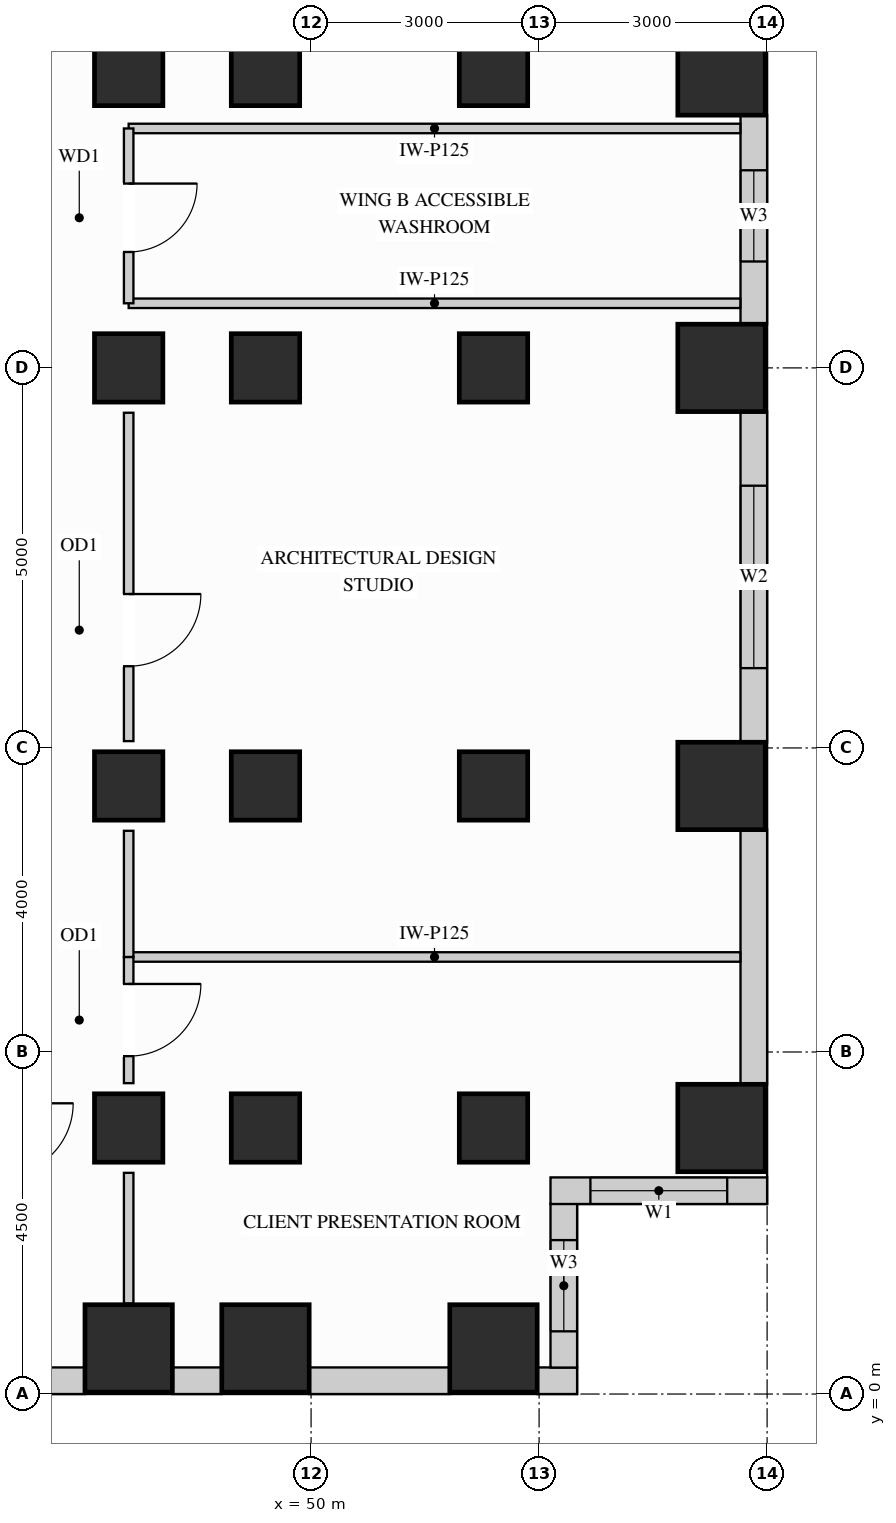
"""IFC4 building model, lengths in metres.
Left out: names, types, materials, properties, quantities, classifications, styles, units other than length and angle.
Written with IfcOpenShell. Run it as: python <this file> out.ifc"""

import sys

from ifc_helpers import new_model, si_unit, direction, frame, frame_2d, origin, origin_2d, place, context, subcontext, project, spatial, rectangle, extrude, source, transform, mapped, element, fill, save


model = new_model("IFC4")
c1 = context("Model", 3, precision=1e-05, world=origin(), true_north=direction((0.0, 1.0)))
c2 = subcontext(c1, "Body", "Model", "MODEL_VIEW")
j1 = project(units=[si_unit("LENGTHUNIT", "METRE"), si_unit("PLANEANGLEUNIT", "RADIAN")], contexts=[c1])
p1 = place(None, origin())
s1 = spatial("IfcSite", under=j1, at=p1, CompositionType="ELEMENT")
p2 = place(p1, origin())
s2 = spatial("IfcBuilding", under=s1, at=p2, CompositionType="ELEMENT")
p3 = place(p2, frame((0.0, 0.0, 135.0)))
s3 = spatial("IfcBuildingStorey", under=s2, at=p3, CompositionType="ELEMENT", Elevation=135.0)
m1 = source(origin(), c2, "Body", "SweptSolid", [
    extrude(rectangle(XDim=0.9, YDim=0.9, at=origin_2d()), origin(), (0.0, 0.0, 1.0), 3.32),
])
for number, where, z_axis, x_axis in (
    (1, (47.6, 13.5, 0.0), (0.0, 0.0, 1.0), (1.0, 0.0, 0.0)),
    (2, (47.6, 3.5, 0.0), (0.0, 0.0, 1.0), (1.0, 0.0, 0.0)),
    (3, (47.6, 8.0, 0.0), (0.0, 0.0, 1.0), (1.0, 0.0, 0.0)),
    (4, (47.6, 17.4, 0.0), (0.0, 0.0, 1.0), (1.0, 0.0, 0.0)),
    (5, (49.4, 13.5, 0.0), (0.0, 0.0, 1.0), (1.0, 0.0, 0.0)),
    (6, (49.4, 17.4, 0.0), (0.0, 0.0, 1.0), (1.0, 0.0, 0.0)),
    (7, (49.4, 3.5, 0.0), (0.0, 0.0, 1.0), (1.0, 0.0, 0.0)),
    (8, (49.4, 8.0, 0.0), (0.0, 0.0, 1.0), (1.0, 0.0, 0.0)),
    (9, (52.4, 13.5, 0.0), (0.0, 0.0, 1.0), (1.0, 0.0, 0.0)),
    (10, (52.4, 17.4, 0.0), (0.0, 0.0, 1.0), (1.0, 0.0, 0.0)),
    (11, (52.4, 3.5, 0.0), (0.0, 0.0, 1.0), (1.0, 0.0, 0.0)),
    (12, (52.4, 8.0, 0.0), (0.0, 0.0, 1.0), (1.0, 0.0, 0.0)),
):
    element("IfcColumn", number, at=place(p3, frame(where, z_axis=z_axis, x_axis=x_axis)), inside=s3, PredefinedType="COLUMN", context=c2, shape_type="MappedRepresentation", body=[
        mapped(m1, transform((0.0, 0.0, 0.0), x_axis=(1.0, 0.0, 0.0), y_axis=(0.0, 1.0, 0.0), z_axis=(0.0, 0.0, 1.0))),
    ])
m2 = source(origin(), c2, "Body", "SweptSolid", [
    extrude(rectangle(XDim=1.15, YDim=1.15, at=origin_2d()), origin(), (0.0, 0.0, 1.0), 3.32),
])
for number, where, z_axis, x_axis in (
    (13, (55.4, 13.5, 0.0), (0.0, 0.0, 1.0), (1.0, 0.0, 0.0)),
    (14, (55.4, 17.4, 0.0), (0.0, 0.0, 1.0), (1.0, 0.0, 0.0)),
    (15, (55.4, 3.5, 0.0), (0.0, 0.0, 1.0), (1.0, 0.0, 0.0)),
    (16, (55.4, 8.0, 0.0), (0.0, 0.0, 1.0), (1.0, 0.0, 0.0)),
    (17, (47.6, 0.6, 0.0), (0.0, 0.0, 1.0), (1.0, 0.0, 0.0)),
    (18, (49.4, 0.6, 0.0), (0.0, 0.0, 1.0), (1.0, 0.0, 0.0)),
    (19, (52.4, 0.6, 0.0), (0.0, 0.0, 1.0), (1.0, 0.0, 0.0)),
):
    element("IfcColumn", number, at=place(p3, frame(where, z_axis=z_axis, x_axis=x_axis)), inside=s3, PredefinedType="COLUMN", context=c2, shape_type="MappedRepresentation", body=[
        mapped(m2, transform((0.0, 0.0, 0.0), x_axis=(1.0, 0.0, 0.0), y_axis=(0.0, 1.0, 0.0), z_axis=(0.0, 0.0, 1.0))),
    ])
p4 = place(p3, frame((40.573, 0.175, 0.0), z_axis=(0.0, 0.0, 1.0), x_axis=(1.0, 0.0, 0.0)))
e20 = element("IfcWall", 20, at=p4, inside=s3, PredefinedType="SOLIDWALL", context=c2, shape_type="SweptSolid", body=[
    extrude(rectangle(XDim=6.454, YDim=0.35, at=frame_2d((3.227, 0.0))), origin(), (0.0, 0.0, 1.0), 3.305),
])
p5 = place(p4, frame((0.712, 0.0, 0.78)))
e21 = element("IfcOpeningElement", 21, at=p5, cuts=e20, PredefinedType="OPENING", context=c2, shape_type="SweptSolid", body=[
    extrude(rectangle(XDim=1.8, YDim=2.1, at=frame_2d((0.9, 1.05))), frame((0.0, 0.185, 0.0), z_axis=(0.0, -1.0, 0.0), x_axis=(1.0, 0.0, 0.0)), (0.0, 0.0, 1.0), 0.37),
])
p6 = place(p4, frame((2.905, 0.0, 0.78)))
e22 = element("IfcOpeningElement", 22, at=p6, cuts=e20, PredefinedType="OPENING", context=c2, shape_type="SweptSolid", body=[
    extrude(rectangle(XDim=1.8, YDim=2.1, at=frame_2d((0.9, 1.05))), frame((0.0, 0.185, 0.0), z_axis=(0.0, -1.0, 0.0), x_axis=(1.0, 0.0, 0.0)), (0.0, 0.0, 1.0), 0.37),
])
m3 = source(origin(), c2, "Body", "SweptSolid", [
    extrude(rectangle(XDim=0.654, YDim=0.35, at=frame_2d((0.327, 0.0))), origin(), (0.0, 0.0, 1.0), 3.305),
])
p7 = place(p3, frame((48.173, 0.175, 0.0), z_axis=(0.0, 0.0, 1.0), x_axis=(1.0, 0.0, 0.0)))
e23 = element("IfcWall", 23, at=p7, inside=s3, PredefinedType="SOLIDWALL", context=c2, shape_type="MappedRepresentation", body=[
    mapped(m3, transform((0.0, 0.0, 0.0), x_axis=(1.0, 0.0, 0.0), y_axis=(0.0, 1.0, 0.0), z_axis=(0.0, 0.0, 1.0))),
])
m4 = source(origin(), c2, "Body", "SweptSolid", [
    extrude(rectangle(XDim=1.854, YDim=0.35, at=frame_2d((0.927, 0.0))), origin(), (0.0, 0.0, 1.0), 3.305),
])
p8 = place(p3, frame((49.973, 0.175, 0.0), z_axis=(0.0, 0.0, 1.0), x_axis=(1.0, 0.0, 0.0)))
e24 = element("IfcWall", 24, at=p8, inside=s3, PredefinedType="SOLIDWALL", context=c2, shape_type="MappedRepresentation", body=[
    mapped(m4, transform((0.0, 0.0, 0.0), x_axis=(1.0, 0.0, 0.0), y_axis=(0.0, 1.0, 0.0), z_axis=(0.0, 0.0, 1.0))),
])
m5 = source(origin(), c2, "Body", "SweptSolid", [
    extrude(rectangle(XDim=0.527, YDim=0.35, at=frame_2d((0.264, 0.0))), origin(), (0.0, 0.0, 1.0), 3.305),
])
p9 = place(p3, frame((52.973, 0.175, 0.0), z_axis=(0.0, 0.0, 1.0), x_axis=(1.0, 0.0, 0.0)))
e25 = element("IfcWall", 25, at=p9, inside=s3, PredefinedType="SOLIDWALL", context=c2, shape_type="MappedRepresentation", body=[
    mapped(m5, transform((0.0, 0.0, 0.0), x_axis=(1.0, 0.0, 0.0), y_axis=(0.0, 1.0, 0.0), z_axis=(0.0, 0.0, 1.0))),
])
p10 = place(p3, frame((53.325, 0.348, 0.0), z_axis=(0.0, 0.0, 1.0), x_axis=(0.0, 1.0, 0.0)))
e26 = element("IfcWall", 26, at=p10, inside=s3, PredefinedType="SOLIDWALL", context=c2, shape_type="SweptSolid", body=[
    extrude(rectangle(XDim=2.154, YDim=0.35, at=frame_2d((1.077, 0.0))), origin(), (0.0, 0.0, 1.0), 3.305),
])
p11 = place(p10, frame((0.477, 0.0, 0.78)))
e27 = element("IfcOpeningElement", 27, at=p11, cuts=e26, PredefinedType="OPENING", context=c2, shape_type="SweptSolid", body=[
    extrude(rectangle(XDim=1.2, YDim=2.1, at=frame_2d((0.6, 1.05))), frame((0.0, 0.185, 0.0), z_axis=(0.0, -1.0, 0.0), x_axis=(1.0, 0.0, 0.0)), (0.0, 0.0, 1.0), 0.37),
])
p12 = place(p3, frame((53.15, 2.675, 0.0), z_axis=(0.0, 0.0, 1.0), x_axis=(1.0, 0.0, 0.0)))
e28 = element("IfcWall", 28, at=p12, inside=s3, PredefinedType="SOLIDWALL", context=c2, shape_type="SweptSolid", body=[
    extrude(rectangle(XDim=2.85, YDim=0.35, at=frame_2d((1.425, 0.0))), origin(), (0.0, 0.0, 1.0), 3.305),
])
p13 = place(p12, frame((0.525, 0.0, 0.78)))
e29 = element("IfcOpeningElement", 29, at=p13, cuts=e28, PredefinedType="OPENING", context=c2, shape_type="SweptSolid", body=[
    extrude(rectangle(XDim=1.8, YDim=2.1, at=frame_2d((0.9, 1.05))), frame((0.0, 0.185, 0.0), z_axis=(0.0, -1.0, 0.0), x_axis=(1.0, 0.0, 0.0)), (0.0, 0.0, 1.0), 0.37),
])
m6 = source(origin(), c2, "Body", "SweptSolid", [
    extrude(rectangle(XDim=3.354, YDim=0.35, at=frame_2d((1.677, 0.0))), origin(), (0.0, 0.0, 1.0), 3.305),
])
p14 = place(p3, frame((55.825, 4.073, 0.0), z_axis=(0.0, 0.0, 1.0), x_axis=(0.0, 1.0, 0.0)))
e30 = element("IfcWall", 30, at=p14, inside=s3, PredefinedType="SOLIDWALL", context=c2, shape_type="MappedRepresentation", body=[
    mapped(m6, transform((0.0, 0.0, 0.0), x_axis=(1.0, 0.0, 0.0), y_axis=(0.0, 1.0, 0.0), z_axis=(0.0, 0.0, 1.0))),
])
p15 = place(p3, frame((55.825, 8.573, 0.0), z_axis=(0.0, 0.0, 1.0), x_axis=(0.0, 1.0, 0.0)))
e31 = element("IfcWall", 31, at=p15, inside=s3, PredefinedType="SOLIDWALL", context=c2, shape_type="SweptSolid", body=[
    extrude(rectangle(XDim=4.354, YDim=0.35, at=frame_2d((2.177, 0.0))), origin(), (0.0, 0.0, 1.0), 3.305),
])
p16 = place(p15, frame((0.977, 0.0, 0.78)))
e32 = element("IfcOpeningElement", 32, at=p16, cuts=e31, PredefinedType="OPENING", context=c2, shape_type="SweptSolid", body=[
    extrude(rectangle(XDim=2.4, YDim=2.1, at=frame_2d((1.2, 1.05))), frame((0.0, 0.185, 0.0), z_axis=(0.0, -1.0, 0.0), x_axis=(1.0, 0.0, 0.0)), (0.0, 0.0, 1.0), 0.37),
])
p17 = place(p3, frame((55.825, 14.073, 0.0), z_axis=(0.0, 0.0, 1.0), x_axis=(0.0, 1.0, 0.0)))
e33 = element("IfcWall", 33, at=p17, inside=s3, PredefinedType="SOLIDWALL", context=c2, shape_type="SweptSolid", body=[
    extrude(rectangle(XDim=2.754, YDim=0.35, at=frame_2d((1.377, 0.0))), origin(), (0.0, 0.0, 1.0), 3.305),
])
p18 = place(p17, frame((0.827, 0.0, 0.78)))
e34 = element("IfcOpeningElement", 34, at=p18, cuts=e33, PredefinedType="OPENING", context=c2, shape_type="SweptSolid", body=[
    extrude(rectangle(XDim=1.2, YDim=2.1, at=frame_2d((0.6, 1.05))), frame((0.0, 0.185, 0.0), z_axis=(0.0, -1.0, 0.0), x_axis=(1.0, 0.0, 0.0)), (0.0, 0.0, 1.0), 0.37),
])
m7 = source(origin(), c2, "Body", "SweptSolid", [
    extrude(rectangle(XDim=8.048, YDim=0.125, at=frame_2d((4.024, 0.0))), origin(), (0.0, 0.0, 1.0), 3.305),
])
p19 = place(p3, frame((47.6, 14.35, 0.0), z_axis=(0.0, 0.0, 1.0), x_axis=(1.0, 0.0, 0.0)))
e35 = element("IfcWall", 35, at=p19, inside=s3, PredefinedType="PARTITIONING", context=c2, shape_type="MappedRepresentation", body=[
    mapped(m7, transform((0.0, 0.0, 0.0), x_axis=(1.0, 0.0, 0.0), y_axis=(0.0, 1.0, 0.0), z_axis=(0.0, 0.0, 1.0))),
])
m8 = source(origin(), c2, "Body", "SweptSolid", [
    extrude(rectangle(XDim=8.048, YDim=0.125, at=frame_2d((4.024, 0.0))), origin(), (0.0, 0.0, 1.0), 2.617),
])
p20 = place(p3, frame((47.6, 16.65, 0.0), z_axis=(0.0, 0.0, 1.0), x_axis=(1.0, 0.0, 0.0)))
e36 = element("IfcWall", 36, at=p20, inside=s3, PredefinedType="PARTITIONING", context=c2, shape_type="MappedRepresentation", body=[
    mapped(m8, transform((0.0, 0.0, 0.0), x_axis=(1.0, 0.0, 0.0), y_axis=(0.0, 1.0, 0.0), z_axis=(0.0, 0.0, 1.0))),
])
p21 = place(p3, frame((47.6, 5.75, 0.0), z_axis=(0.0, 0.0, 1.0), x_axis=(1.0, 0.0, 0.0)))
e37 = element("IfcWall", 37, at=p21, inside=s3, PredefinedType="PARTITIONING", context=c2, shape_type="MappedRepresentation", body=[
    mapped(m7, transform((0.0, 0.0, 0.0), x_axis=(1.0, 0.0, 0.0), y_axis=(0.0, 1.0, 0.0), z_axis=(0.0, 0.0, 1.0))),
])
p22 = place(p3, frame((47.6, 4.09, 0.0), z_axis=(0.0, 0.0, 1.0), x_axis=(0.0, 1.0, 0.0)))
e38 = element("IfcWall", 38, at=p22, inside=s3, PredefinedType="PARTITIONING", context=c2, shape_type="SweptSolid", body=[
    extrude(rectangle(XDim=1.66, YDim=0.125, at=frame_2d((0.83, 0.0))), origin(), (0.0, 0.0, 1.0), 2.617),
])
p23 = place(p22, frame((0.355, 0.0, 0.0)))
e39 = element("IfcOpeningElement", 39, at=p23, cuts=e38, PredefinedType="OPENING", context=c2, shape_type="SweptSolid", body=[
    extrude(rectangle(XDim=0.95, YDim=2.15, at=frame_2d((0.475, 1.075))), frame((0.0, 0.073, 0.0), z_axis=(0.0, -1.0, 0.0), x_axis=(1.0, 0.0, 0.0)), (0.0, 0.0, 1.0), 0.145),
])
m9 = source(origin(), c2, "Body", "SweptSolid", [
    extrude(rectangle(XDim=1.72, YDim=0.125, at=frame_2d((0.86, 0.0))), origin(), (0.0, 0.0, 1.0), 2.617),
])
p24 = place(p3, frame((47.6, 1.19, 0.0), z_axis=(0.0, 0.0, 1.0), x_axis=(0.0, 1.0, 0.0)))
e40 = element("IfcWall", 40, at=p24, inside=s3, PredefinedType="PARTITIONING", context=c2, shape_type="MappedRepresentation", body=[
    mapped(m9, transform((0.0, 0.0, 0.0), x_axis=(1.0, 0.0, 0.0), y_axis=(0.0, 1.0, 0.0), z_axis=(0.0, 0.0, 1.0))),
])
m10 = source(origin(), c2, "Body", "SweptSolid", [
    extrude(rectangle(XDim=1.66, YDim=0.125, at=frame_2d((0.83, 0.0))), origin(), (0.0, 0.0, 1.0), 2.617),
])
p25 = place(p3, frame((47.6, 5.75, 0.0), z_axis=(0.0, 0.0, 1.0), x_axis=(0.0, 1.0, 0.0)))
e41 = element("IfcWall", 41, at=p25, inside=s3, PredefinedType="PARTITIONING", context=c2, shape_type="MappedRepresentation", body=[
    mapped(m10, transform((0.0, 0.0, 0.0), x_axis=(1.0, 0.0, 0.0), y_axis=(0.0, 1.0, 0.0), z_axis=(0.0, 0.0, 1.0))),
])
p26 = place(p3, frame((47.6, 8.59, 0.0), z_axis=(0.0, 0.0, 1.0), x_axis=(0.0, 1.0, 0.0)))
e42 = element("IfcWall", 42, at=p26, inside=s3, PredefinedType="PARTITIONING", context=c2, shape_type="SweptSolid", body=[
    extrude(rectangle(XDim=4.32, YDim=0.125, at=frame_2d((2.16, 0.0))), origin(), (0.0, 0.0, 1.0), 2.617),
])
p27 = place(p26, frame((0.985, 0.0, 0.0)))
e43 = element("IfcOpeningElement", 43, at=p27, cuts=e42, PredefinedType="OPENING", context=c2, shape_type="SweptSolid", body=[
    extrude(rectangle(XDim=0.95, YDim=2.15, at=frame_2d((0.475, 1.075))), frame((0.0, 0.073, 0.0), z_axis=(0.0, -1.0, 0.0), x_axis=(1.0, 0.0, 0.0)), (0.0, 0.0, 1.0), 0.145),
])
p28 = place(p3, frame((47.6, 14.35, 0.0), z_axis=(0.0, 0.0, 1.0), x_axis=(0.0, 1.0, 0.0)))
e44 = element("IfcWall", 44, at=p28, inside=s3, PredefinedType="PARTITIONING", context=c2, shape_type="SweptSolid", body=[
    extrude(rectangle(XDim=2.3, YDim=0.125, at=frame_2d((1.15, 0.0))), origin(), (0.0, 0.0, 1.0), 2.617),
])
p29 = place(p28, frame((0.675, 0.0, 0.0)))
e45 = element("IfcOpeningElement", 45, at=p29, cuts=e44, PredefinedType="OPENING", context=c2, shape_type="SweptSolid", body=[
    extrude(rectangle(XDim=0.9, YDim=2.15, at=frame_2d((0.45, 1.075))), frame((0.0, 0.073, 0.0), z_axis=(0.0, -1.0, 0.0), x_axis=(1.0, 0.0, 0.0)), (0.0, 0.0, 1.0), 0.145),
])
m11 = source(origin(), c2, "Body", "SweptSolid", [
    extrude(rectangle(XDim=0.95, YDim=2.15, at=frame_2d((0.475, 1.075))), frame((0.0, 0.025, 0.0), z_axis=(0.0, -1.0, 0.0), x_axis=(1.0, 0.0, 0.0)), (0.0, 0.0, 1.0), 0.05),
])
p30 = place(p23, origin())
e46 = element("IfcDoor", 46, at=p30, inside=s3, OperationType="SINGLE_SWING_RIGHT", PredefinedType="DOOR", context=c2, shape_type="MappedRepresentation", body=[
    mapped(m11, transform((0.0, 0.0, 0.0), x_axis=(1.0, 0.0, 0.0), y_axis=(0.0, 1.0, 0.0), z_axis=(0.0, 0.0, 1.0))),
])
fill(e39, e46)
p31 = place(p27, origin())
e47 = element("IfcDoor", 47, at=p31, inside=s3, OperationType="SINGLE_SWING_RIGHT", PredefinedType="DOOR", context=c2, shape_type="MappedRepresentation", body=[
    mapped(m11, transform((0.0, 0.0, 0.0), x_axis=(1.0, 0.0, 0.0), y_axis=(0.0, 1.0, 0.0), z_axis=(0.0, 0.0, 1.0))),
])
fill(e43, e47)
m12 = source(origin(), c2, "Body", "SweptSolid", [
    extrude(rectangle(XDim=0.9, YDim=2.15, at=frame_2d((0.45, 1.075))), frame((0.0, 0.025, 0.0), z_axis=(0.0, -1.0, 0.0), x_axis=(1.0, 0.0, 0.0)), (0.0, 0.0, 1.0), 0.05),
])
p32 = place(p29, origin())
e48 = element("IfcDoor", 48, at=p32, inside=s3, OperationType="SINGLE_SWING_RIGHT", PredefinedType="DOOR", context=c2, shape_type="MappedRepresentation", body=[
    mapped(m12, transform((0.0, 0.0, 0.0), x_axis=(1.0, 0.0, 0.0), y_axis=(0.0, 1.0, 0.0), z_axis=(0.0, 0.0, 1.0))),
])
fill(e45, e48)
m13 = source(origin(), c2, "Body", "SweptSolid", [
    extrude(rectangle(XDim=1.8, YDim=2.1, at=frame_2d((0.9, 1.05))), frame((0.0, 0.03, 0.0), z_axis=(0.0, -1.0, 0.0), x_axis=(1.0, 0.0, 0.0)), (0.0, 0.0, 1.0), 0.06),
])
p33 = place(p13, origin())
e49 = element("IfcWindow", 49, at=p33, inside=s3, PartitioningType="SINGLE_PANEL", PredefinedType="WINDOW", context=c2, shape_type="MappedRepresentation", body=[
    mapped(m13, transform((0.0, 0.0, 0.0), x_axis=(1.0, 0.0, 0.0), y_axis=(0.0, 1.0, 0.0), z_axis=(0.0, 0.0, 1.0))),
])
fill(e29, e49)
m14 = source(origin(), c2, "Body", "SweptSolid", [
    extrude(rectangle(XDim=2.4, YDim=2.1, at=frame_2d((1.2, 1.05))), frame((0.0, 0.03, 0.0), z_axis=(0.0, -1.0, 0.0), x_axis=(1.0, 0.0, 0.0)), (0.0, 0.0, 1.0), 0.06),
])
p34 = place(p16, origin())
e50 = element("IfcWindow", 50, at=p34, inside=s3, PartitioningType="SINGLE_PANEL", PredefinedType="WINDOW", context=c2, shape_type="MappedRepresentation", body=[
    mapped(m14, transform((0.0, 0.0, 0.0), x_axis=(1.0, 0.0, 0.0), y_axis=(0.0, 1.0, 0.0), z_axis=(0.0, 0.0, 1.0))),
])
fill(e32, e50)
m15 = source(origin(), c2, "Body", "SweptSolid", [
    extrude(rectangle(XDim=1.2, YDim=2.1, at=frame_2d((0.6, 1.05))), frame((0.0, 0.03, 0.0), z_axis=(0.0, -1.0, 0.0), x_axis=(1.0, 0.0, 0.0)), (0.0, 0.0, 1.0), 0.06),
])
p35 = place(p11, origin())
e51 = element("IfcWindow", 51, at=p35, inside=s3, PartitioningType="SINGLE_PANEL", PredefinedType="WINDOW", context=c2, shape_type="MappedRepresentation", body=[
    mapped(m15, transform((0.0, 0.0, 0.0), x_axis=(1.0, 0.0, 0.0), y_axis=(0.0, 1.0, 0.0), z_axis=(0.0, 0.0, 1.0))),
])
fill(e27, e51)
p36 = place(p18, origin())
e52 = element("IfcWindow", 52, at=p36, inside=s3, PartitioningType="SINGLE_PANEL", PredefinedType="WINDOW", context=c2, shape_type="MappedRepresentation", body=[
    mapped(m15, transform((0.0, 0.0, 0.0), x_axis=(1.0, 0.0, 0.0), y_axis=(0.0, 1.0, 0.0), z_axis=(0.0, 0.0, 1.0))),
])
fill(e34, e52)
save(model, sys.argv[1])
